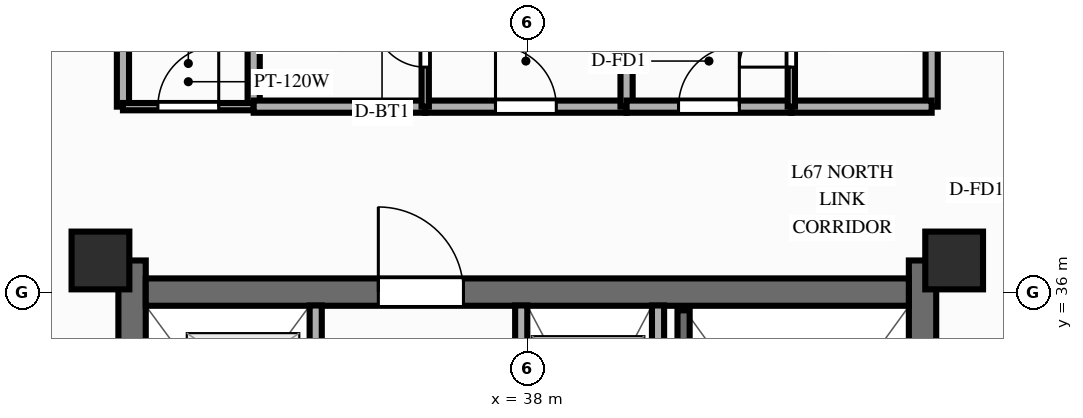
"""IFC4 building model, lengths in metres.
Left out: names, types, materials, properties, quantities, classifications, styles, units other than length and angle.
Written with IfcOpenShell. Run it as: python <this file> out.ifc"""

import sys

from ifc_helpers import new_model, si_unit, direction, frame, frame_2d, origin, origin_2d, place, context, subcontext, project, spatial, rectangle, extrude, source, transform, mapped, element, fill, save


model = new_model("IFC4")
c1 = context("Model", 3, precision=1e-05, world=origin(), true_north=direction((0.0, 1.0)))
c2 = subcontext(c1, "Body", "Model", "MODEL_VIEW")
j1 = project(units=[si_unit("LENGTHUNIT", "METRE"), si_unit("PLANEANGLEUNIT", "RADIAN")], contexts=[c1])
p1 = place(None, origin())
s1 = spatial("IfcSite", under=j1, at=p1, CompositionType="ELEMENT")
p2 = place(p1, origin())
s2 = spatial("IfcBuilding", under=s1, at=p2, CompositionType="ELEMENT")
p3 = place(p2, frame((0.0, 0.0, 216.3)))
s3 = spatial("IfcBuildingStorey", under=s2, at=p3, CompositionType="ELEMENT", Elevation=216.3)
p4 = place(p3, frame((31.5, 17.48, 0.0), z_axis=(0.0, 0.0, 1.0), x_axis=(0.0, 1.0, 0.0)))
e1 = element("IfcWall", 1, at=p4, inside=s3, PredefinedType="SHEAR", context=c2, shape_type="SweptSolid", body=[
    extrude(rectangle(XDim=19.04, YDim=0.45, at=frame_2d((9.52, 0.0))), origin(), (0.0, 0.0, 1.0), 3.9),
])
p5 = place(p4, frame((6.32, 0.0, 0.0)))
e2 = element("IfcOpeningElement", 2, at=p5, cuts=e1, PredefinedType="OPENING", context=c2, shape_type="SweptSolid", body=[
    extrude(rectangle(XDim=1.1, YDim=2.15, at=frame_2d((0.55, 1.075))), frame((0.0, 0.237, 0.0), z_axis=(0.0, -1.0, 0.0), x_axis=(1.0, 0.0, 0.0)), (0.0, 0.0, 1.0), 0.474),
])
p6 = place(p3, frame((44.5, 17.48, 0.0), z_axis=(0.0, 0.0, 1.0), x_axis=(0.0, 1.0, 0.0)))
e3 = element("IfcWall", 3, at=p6, inside=s3, PredefinedType="SHEAR", context=c2, shape_type="SweptSolid", body=[
    extrude(rectangle(XDim=19.04, YDim=0.45, at=frame_2d((9.52, 0.0))), origin(), (0.0, 0.0, 1.0), 3.9),
])
p7 = place(p6, frame((12.67, 0.0, 0.0), z_axis=(0.0, 0.0, 1.0), x_axis=(-1.0, 0.0, 0.0)))
e4 = element("IfcOpeningElement", 4, at=p7, cuts=e3, PredefinedType="OPENING", context=c2, shape_type="SweptSolid", body=[
    extrude(rectangle(XDim=1.1, YDim=2.15, at=frame_2d((0.55, 1.075))), frame((0.0, 0.237, 0.0), z_axis=(0.0, -1.0, 0.0), x_axis=(1.0, 0.0, 0.0)), (0.0, 0.0, 1.0), 0.474),
])
p8 = place(p3, frame((31.725, 36.0, 0.0), z_axis=(0.0, 0.0, 1.0), x_axis=(1.0, 0.0, 0.0)))
e5 = element("IfcWall", 5, at=p8, inside=s3, PredefinedType="SHEAR", context=c2, shape_type="SweptSolid", body=[
    extrude(rectangle(XDim=12.55, YDim=0.45, at=frame_2d((6.275, 0.0))), origin(), (0.0, 0.0, 1.0), 3.9),
])
p9 = place(p8, frame((5.225, 0.0, 0.0), z_axis=(0.0, 0.0, 1.0), x_axis=(-1.0, 0.0, 0.0)))
e6 = element("IfcOpeningElement", 6, at=p9, cuts=e5, PredefinedType="OPENING", context=c2, shape_type="SweptSolid", body=[
    extrude(rectangle(XDim=1.4, YDim=2.15, at=frame_2d((0.7, 1.075))), frame((0.0, 0.237, 0.0), z_axis=(0.0, -1.0, 0.0), x_axis=(1.0, 0.0, 0.0)), (0.0, 0.0, 1.0), 0.474),
])
m1 = source(origin(), c2, "Body", "SweptSolid", [
    extrude(rectangle(XDim=0.95, YDim=0.95, at=origin_2d()), origin(), (0.0, 0.0, 1.0), 3.9),
])
for number, where, z_axis, x_axis in (
    (7, (30.98, 36.52, 0.0), (0.0, 0.0, 1.0), (1.0, 0.0, 0.0)),
    (8, (45.02, 36.52, 0.0), (0.0, 0.0, 1.0), (1.0, 0.0, 0.0)),
):
    element("IfcColumn", number, at=place(p3, frame(where, z_axis=z_axis, x_axis=x_axis)), inside=s3, PredefinedType="COLUMN", context=c2, shape_type="MappedRepresentation", body=[
        mapped(m1, transform((0.0, 0.0, 0.0), scale=1.0)),
    ])
p10 = place(p3, frame((40.15, 31.8, 0.0), z_axis=(0.0, 0.0, 1.0), x_axis=(0.0, 1.0, 0.0)))
e9 = element("IfcWall", 9, at=p10, inside=s3, PredefinedType="PARTITIONING", context=c2, shape_type="SweptSolid", body=[
    extrude(rectangle(XDim=3.98, YDim=0.2, at=frame_2d((1.99, 0.0))), origin(), (0.0, 0.0, 1.0), 3.56),
])
p11 = place(p3, frame((40.57, 28.65, 0.0), z_axis=(0.0, 0.0, 1.0), x_axis=(0.0, 1.0, 0.0)))
e10 = element("IfcWall", 10, at=p11, inside=s3, PredefinedType="SOLIDWALL", context=c2, shape_type="SweptSolid", body=[
    extrude(rectangle(XDim=7.05, YDim=0.2, at=frame_2d((3.525, 0.0))), origin(), (0.0, 0.0, 1.0), 3.69),
])
p12 = place(p3, frame((34.52, 25.44, 0.0), z_axis=(0.0, 0.0, 1.0), x_axis=(0.0, 1.0, 0.0)))
e11 = element("IfcWall", 11, at=p12, inside=s3, PredefinedType="PARTITIONING", context=c2, shape_type="SweptSolid", body=[
    extrude(rectangle(XDim=10.34, YDim=0.2, at=frame_2d((5.17, 0.0))), origin(), (0.0, 0.0, 1.0), 3.56),
])
p13 = place(p12, frame((0.65, 0.0, 0.0)))
e12 = element("IfcOpeningElement", 12, at=p13, cuts=e11, PredefinedType="OPENING", context=c2, shape_type="SweptSolid", body=[
    extrude(rectangle(XDim=0.8, YDim=2.05, at=frame_2d((0.4, 1.025))), frame((0.0, 0.112, 0.0), z_axis=(0.0, -1.0, 0.0), x_axis=(1.0, 0.0, 0.0)), (0.0, 0.0, 1.0), 0.224),
])
p14 = place(p12, frame((2.75, 0.0, 0.0)))
e13 = element("IfcOpeningElement", 13, at=p14, cuts=e11, PredefinedType="OPENING", context=c2, shape_type="SweptSolid", body=[
    extrude(rectangle(XDim=0.8, YDim=2.05, at=frame_2d((0.4, 1.025))), frame((0.0, 0.112, 0.0), z_axis=(0.0, -1.0, 0.0), x_axis=(1.0, 0.0, 0.0)), (0.0, 0.0, 1.0), 0.224),
])
p15 = place(p12, frame((4.95, 0.0, 0.0)))
e14 = element("IfcOpeningElement", 14, at=p15, cuts=e11, PredefinedType="OPENING", context=c2, shape_type="SweptSolid", body=[
    extrude(rectangle(XDim=0.8, YDim=2.05, at=frame_2d((0.4, 1.025))), frame((0.0, 0.112, 0.0), z_axis=(0.0, -1.0, 0.0), x_axis=(1.0, 0.0, 0.0)), (0.0, 0.0, 1.0), 0.224),
])
p16 = place(p12, frame((7.01, 0.0, 0.0)))
e15 = element("IfcOpeningElement", 15, at=p16, cuts=e11, PredefinedType="OPENING", context=c2, shape_type="SweptSolid", body=[
    extrude(rectangle(XDim=1.0, YDim=2.15, at=frame_2d((0.5, 1.075))), frame((0.0, 0.112, 0.0), z_axis=(0.0, -1.0, 0.0), x_axis=(1.0, 0.0, 0.0)), (0.0, 0.0, 1.0), 0.224),
])
p17 = place(p12, frame((8.76, 0.0, 0.0)))
e16 = element("IfcOpeningElement", 16, at=p17, cuts=e11, PredefinedType="OPENING", context=c2, shape_type="SweptSolid", body=[
    extrude(rectangle(XDim=1.0, YDim=2.15, at=frame_2d((0.5, 1.075))), frame((0.0, 0.112, 0.0), z_axis=(0.0, -1.0, 0.0), x_axis=(1.0, 0.0, 0.0)), (0.0, 0.0, 1.0), 0.224),
])
p18 = place(p3, frame((37.9, 25.44, 0.0), z_axis=(0.0, 0.0, 1.0), x_axis=(0.0, 1.0, 0.0)))
e17 = element("IfcWall", 17, at=p18, inside=s3, PredefinedType="PARTITIONING", context=c2, shape_type="SweptSolid", body=[
    extrude(rectangle(XDim=10.34, YDim=0.2, at=frame_2d((5.17, 0.0))), origin(), (0.0, 0.0, 1.0), 3.56),
])
p19 = place(p18, frame((1.15, 0.0, 0.0)))
e18 = element("IfcOpeningElement", 18, at=p19, cuts=e17, PredefinedType="OPENING", context=c2, shape_type="SweptSolid", body=[
    extrude(rectangle(XDim=0.9, YDim=2.1, at=frame_2d((0.45, 1.05))), frame((0.0, 0.112, 0.0), z_axis=(0.0, -1.0, 0.0), x_axis=(1.0, 0.0, 0.0)), (0.0, 0.0, 1.0), 0.224),
])
p20 = place(p18, frame((4.2, 0.0, 0.0)))
e19 = element("IfcOpeningElement", 19, at=p20, cuts=e17, PredefinedType="OPENING", context=c2, shape_type="SweptSolid", body=[
    extrude(rectangle(XDim=0.9, YDim=2.1, at=frame_2d((0.45, 1.05))), frame((0.0, 0.112, 0.0), z_axis=(0.0, -1.0, 0.0), x_axis=(1.0, 0.0, 0.0)), (0.0, 0.0, 1.0), 0.224),
])
p21 = place(p18, frame((6.86, 0.0, 0.0)))
e20 = element("IfcOpeningElement", 20, at=p21, cuts=e17, PredefinedType="OPENING", context=c2, shape_type="SweptSolid", body=[
    extrude(rectangle(XDim=1.0, YDim=2.15, at=frame_2d((0.5, 1.075))), frame((0.0, 0.112, 0.0), z_axis=(0.0, -1.0, 0.0), x_axis=(1.0, 0.0, 0.0)), (0.0, 0.0, 1.0), 0.224),
])
p22 = place(p18, frame((8.71, 0.0, 0.0)))
e21 = element("IfcOpeningElement", 21, at=p22, cuts=e17, PredefinedType="OPENING", context=c2, shape_type="SweptSolid", body=[
    extrude(rectangle(XDim=1.0, YDim=2.15, at=frame_2d((0.5, 1.075))), frame((0.0, 0.112, 0.0), z_axis=(0.0, -1.0, 0.0), x_axis=(1.0, 0.0, 0.0)), (0.0, 0.0, 1.0), 0.224),
])
for number, where, z_axis, x_axis in (
    (22, (31.35, 39.05, 0.0), (0.0, 0.0, 1.0), (0.0, 1.0, 0.0)),
    (23, (44.65, 39.05, 0.0), (0.0, 0.0, 1.0), (0.0, 1.0, 0.0)),
):
    element("IfcWall", number, at=place(p3, frame(where, z_axis=z_axis, x_axis=x_axis)), inside=s3, PredefinedType="PARTITIONING", context=c2, shape_type="SweptSolid", body=[
        extrude(rectangle(XDim=8.8, YDim=0.2, at=frame_2d((4.4, 0.0))), origin(), (0.0, 0.0, 1.0), 2.44),
    ])
p23 = place(p3, frame((33.5, 39.05, 0.0), z_axis=(0.0, 0.0, 1.0), x_axis=(0.0, 1.0, 0.0)))
e24 = element("IfcWall", 24, at=p23, inside=s3, PredefinedType="PARTITIONING", context=c2, shape_type="SweptSolid", body=[
    extrude(rectangle(XDim=8.8, YDim=0.2, at=frame_2d((4.4, 0.0))), origin(), (0.0, 0.0, 1.0), 3.56),
])
p24 = place(p3, frame((31.35, 39.05, 0.0), z_axis=(0.0, 0.0, 1.0), x_axis=(1.0, 0.0, 0.0)))
e25 = element("IfcWall", 25, at=p24, inside=s3, PredefinedType="PARTITIONING", context=c2, shape_type="SweptSolid", body=[
    extrude(rectangle(XDim=2.15, YDim=0.12, at=frame_2d((1.075, 0.0))), origin(), (0.0, 0.0, 1.0), 3.56),
])
p25 = place(p24, frame((0.575, 0.0, 0.0)))
e26 = element("IfcOpeningElement", 26, at=p25, cuts=e25, PredefinedType="OPENING", context=c2, shape_type="SweptSolid", body=[
    extrude(rectangle(XDim=1.0, YDim=2.1, at=frame_2d((0.5, 1.05))), frame((0.0, 0.072, 0.0), z_axis=(0.0, -1.0, 0.0), x_axis=(1.0, 0.0, 0.0)), (0.0, 0.0, 1.0), 0.144),
])
p26 = place(p3, frame((33.5, 39.05, 0.0), z_axis=(0.0, 0.0, 1.0), x_axis=(1.0, 0.0, 0.0)))
e27 = element("IfcWall", 27, at=p26, inside=s3, PredefinedType="PARTITIONING", context=c2, shape_type="SweptSolid", body=[
    extrude(rectangle(XDim=2.821, YDim=0.2, at=frame_2d((1.411, 0.0))), origin(), (0.0, 0.0, 1.0), 3.56),
])
p27 = place(p3, frame((36.321, 39.05, 0.0), z_axis=(0.0, 0.0, 1.0), x_axis=(1.0, 0.0, 0.0)))
e28 = element("IfcWall", 28, at=p27, inside=s3, PredefinedType="PARTITIONING", context=c2, shape_type="SweptSolid", body=[
    extrude(rectangle(XDim=3.312, YDim=0.2, at=frame_2d((1.656, 0.0))), origin(), (0.0, 0.0, 1.0), 3.56),
])
p28 = place(p27, frame((1.156, 0.0, 0.0)))
e29 = element("IfcOpeningElement", 29, at=p28, cuts=e28, PredefinedType="OPENING", context=c2, shape_type="SweptSolid", body=[
    extrude(rectangle(XDim=1.0, YDim=2.15, at=frame_2d((0.5, 1.075))), frame((0.0, 0.112, 0.0), z_axis=(0.0, -1.0, 0.0), x_axis=(1.0, 0.0, 0.0)), (0.0, 0.0, 1.0), 0.224),
])
p29 = place(p3, frame((36.321, 39.05, 0.0), z_axis=(0.0, 0.0, 1.0), x_axis=(0.0, 1.0, 0.0)))
e30 = element("IfcWall", 30, at=p29, inside=s3, PredefinedType="PARTITIONING", context=c2, shape_type="SweptSolid", body=[
    extrude(rectangle(XDim=2.15, YDim=0.12, at=frame_2d((1.075, 0.0))), origin(), (0.0, 0.0, 1.0), 3.56),
])
p30 = place(p29, frame((0.65, 0.0, 0.0)))
e31 = element("IfcOpeningElement", 31, at=p30, cuts=e30, PredefinedType="OPENING", context=c2, shape_type="SweptSolid", body=[
    extrude(rectangle(XDim=0.85, YDim=2.05, at=frame_2d((0.425, 1.025))), frame((0.0, 0.072, 0.0), z_axis=(0.0, -1.0, 0.0), x_axis=(1.0, 0.0, 0.0)), (0.0, 0.0, 1.0), 0.144),
])
p31 = place(p3, frame((39.633, 39.05, 0.0), z_axis=(0.0, 0.0, 1.0), x_axis=(0.0, 1.0, 0.0)))
e32 = element("IfcWall", 32, at=p31, inside=s3, PredefinedType="PARTITIONING", context=c2, shape_type="SweptSolid", body=[
    extrude(rectangle(XDim=8.8, YDim=0.2, at=frame_2d((4.4, 0.0))), origin(), (0.0, 0.0, 1.0), 3.56),
])
p32 = place(p3, frame((39.633, 39.05, 0.0), z_axis=(0.0, 0.0, 1.0), x_axis=(1.0, 0.0, 0.0)))
e33 = element("IfcWall", 33, at=p32, inside=s3, PredefinedType="PARTITIONING", context=c2, shape_type="SweptSolid", body=[
    extrude(rectangle(XDim=2.709, YDim=0.2, at=frame_2d((1.354, 0.0))), origin(), (0.0, 0.0, 1.0), 3.56),
])
p33 = place(p32, frame((0.855, 0.0, 0.0)))
e34 = element("IfcOpeningElement", 34, at=p33, cuts=e33, PredefinedType="OPENING", context=c2, shape_type="SweptSolid", body=[
    extrude(rectangle(XDim=1.0, YDim=2.15, at=frame_2d((0.5, 1.075))), frame((0.0, 0.112, 0.0), z_axis=(0.0, -1.0, 0.0), x_axis=(1.0, 0.0, 0.0)), (0.0, 0.0, 1.0), 0.224),
])
p34 = place(p3, frame((42.342, 39.05, 0.0), z_axis=(0.0, 0.0, 1.0), x_axis=(1.0, 0.0, 0.0)))
e35 = element("IfcWall", 35, at=p34, inside=s3, PredefinedType="PARTITIONING", context=c2, shape_type="SweptSolid", body=[
    extrude(rectangle(XDim=2.308, YDim=0.2, at=frame_2d((1.154, 0.0))), origin(), (0.0, 0.0, 1.0), 3.56),
])
p35 = place(p3, frame((42.342, 39.05, 0.0), z_axis=(0.0, 0.0, 1.0), x_axis=(0.0, 1.0, 0.0)))
e36 = element("IfcWall", 36, at=p35, inside=s3, PredefinedType="PARTITIONING", context=c2, shape_type="SweptSolid", body=[
    extrude(rectangle(XDim=2.15, YDim=0.12, at=frame_2d((1.075, 0.0))), origin(), (0.0, 0.0, 1.0), 3.56),
])
p36 = place(p35, frame((0.65, 0.0, 0.0)))
e37 = element("IfcOpeningElement", 37, at=p36, cuts=e36, PredefinedType="OPENING", context=c2, shape_type="SweptSolid", body=[
    extrude(rectangle(XDim=0.85, YDim=2.05, at=frame_2d((0.425, 1.025))), frame((0.0, 0.072, 0.0), z_axis=(0.0, -1.0, 0.0), x_axis=(1.0, 0.0, 0.0)), (0.0, 0.0, 1.0), 0.144),
])
m2 = source(origin(), c2, "Body", "SweptSolid", [
    extrude(rectangle(XDim=1.4, YDim=2.15, at=frame_2d((0.7, 1.075))), frame((0.0, 0.025, 0.0), z_axis=(0.0, -1.0, 0.0), x_axis=(1.0, 0.0, 0.0)), (0.0, 0.0, 1.0), 0.05),
])
p37 = place(p9, origin())
e38 = element("IfcDoor", 38, at=p37, inside=s3, OperationType="SINGLE_SWING_RIGHT", PredefinedType="DOOR", context=c2, shape_type="MappedRepresentation", body=[
    mapped(m2, transform((0.0, 0.0, 0.0), scale=1.0)),
])
fill(e6, e38)
m3 = source(origin(), c2, "Body", "SweptSolid", [
    extrude(rectangle(XDim=1.0, YDim=2.1, at=frame_2d((0.5, 1.05))), frame((0.0, 0.025, 0.0), z_axis=(0.0, -1.0, 0.0), x_axis=(1.0, 0.0, 0.0)), (0.0, 0.0, 1.0), 0.05),
])
p38 = place(p25, origin())
e39 = element("IfcDoor", 39, at=p38, inside=s3, OperationType="SINGLE_SWING_RIGHT", PredefinedType="DOOR", context=c2, shape_type="MappedRepresentation", body=[
    mapped(m3, transform((0.0, 0.0, 0.0), scale=1.0)),
])
fill(e26, e39)
m4 = source(origin(), c2, "Body", "SweptSolid", [
    extrude(rectangle(XDim=1.0, YDim=2.15, at=frame_2d((0.5, 1.075))), frame((0.0, 0.025, 0.0), z_axis=(0.0, -1.0, 0.0), x_axis=(1.0, 0.0, 0.0)), (0.0, 0.0, 1.0), 0.05),
])
p39 = place(p28, origin())
e40 = element("IfcDoor", 40, at=p39, inside=s3, OperationType="SINGLE_SWING_LEFT", PredefinedType="DOOR", context=c2, shape_type="MappedRepresentation", body=[
    mapped(m4, transform((0.0, 0.0, 0.0), scale=1.0)),
])
fill(e29, e40)
m5 = source(origin(), c2, "Body", "SweptSolid", [
    extrude(rectangle(XDim=0.85, YDim=2.05, at=frame_2d((0.425, 1.025))), frame((0.0, 0.025, 0.0), z_axis=(0.0, -1.0, 0.0), x_axis=(1.0, 0.0, 0.0)), (0.0, 0.0, 1.0), 0.05),
])
p40 = place(p30, origin())
e41 = element("IfcDoor", 41, at=p40, inside=s3, OperationType="SINGLE_SWING_RIGHT", PredefinedType="DOOR", context=c2, shape_type="MappedRepresentation", body=[
    mapped(m5, transform((0.0, 0.0, 0.0), scale=1.0)),
])
fill(e31, e41)
p41 = place(p33, origin())
e42 = element("IfcDoor", 42, at=p41, inside=s3, OperationType="SINGLE_SWING_RIGHT", PredefinedType="DOOR", context=c2, shape_type="MappedRepresentation", body=[
    mapped(m4, transform((0.0, 0.0, 0.0), scale=1.0)),
])
fill(e34, e42)
p42 = place(p36, origin())
e43 = element("IfcDoor", 43, at=p42, inside=s3, OperationType="SINGLE_SWING_LEFT", PredefinedType="DOOR", context=c2, shape_type="MappedRepresentation", body=[
    mapped(m5, transform((0.0, 0.0, 0.0), scale=1.0)),
])
fill(e37, e43)
save(model, sys.argv[1])
